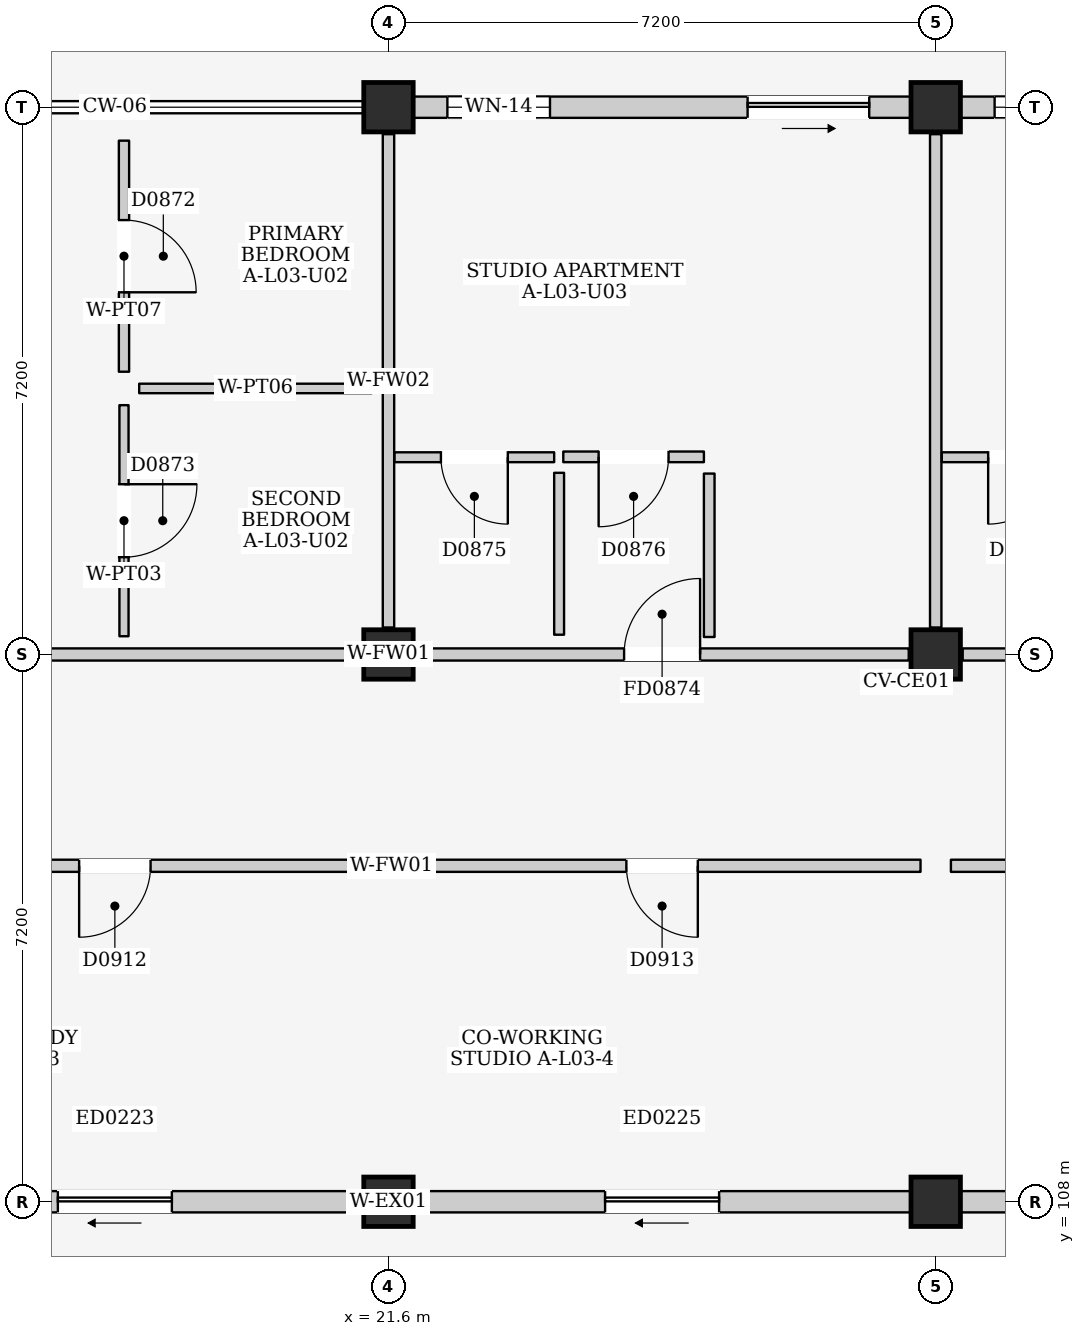
"""IFC4 building model, lengths in metres.
Left out: names, types, materials, properties, quantities, classifications, styles, units other than length and angle.
Written with IfcOpenShell. Run it as: python <this file> out.ifc"""

import sys

from ifc_helpers import new_model, si_unit, direction, frame, frame_2d, origin, origin_2d, place, context, subcontext, project, spatial, rectangle, extrude, element, fill, save


model = new_model("IFC4")
c1 = context("Model", 3, precision=1e-05, world=origin(), true_north=direction((0.0, 1.0)))
c2 = subcontext(c1, "Body", "Model", "MODEL_VIEW")
j1 = project(units=[si_unit("LENGTHUNIT", "METRE"), si_unit("PLANEANGLEUNIT", "RADIAN")], contexts=[c1])
p1 = place(None, origin())
s1 = spatial("IfcSite", under=j1, at=p1, CompositionType="ELEMENT")
p2 = place(p1, origin())
s2 = spatial("IfcBuilding", under=s1, at=p2, CompositionType="ELEMENT")
p3 = place(p2, frame((0.0, 0.0, 12.2)))
s3 = spatial("IfcBuildingStorey", under=s2, at=p3, CompositionType="ELEMENT", Elevation=12.2)
for number, where, z_axis, x_axis in (
    (1, (21.6, 108.0, 0.0), (0.0, 0.0, 1.0), (1.0, 0.0, 0.0)),
    (2, (21.6, 115.2, 0.0), (0.0, 0.0, 1.0), (1.0, 0.0, 0.0)),
    (3, (21.6, 122.4, 0.0), (0.0, 0.0, 1.0), (1.0, 0.0, 0.0)),
    (4, (28.8, 108.0, 0.0), (0.0, 0.0, 1.0), (1.0, 0.0, 0.0)),
    (5, (28.8, 115.2, 0.0), (0.0, 0.0, 1.0), (1.0, 0.0, 0.0)),
    (6, (28.8, 122.4, 0.0), (0.0, 0.0, 1.0), (1.0, 0.0, 0.0)),
):
    element("IfcColumn", number, at=place(p3, frame(where, z_axis=z_axis, x_axis=x_axis)), inside=s3, PredefinedType="COLUMN", context=c2, shape_type="SweptSolid", body=[
        extrude(rectangle(XDim=0.65, YDim=0.65, at=origin_2d()), origin(), (0.0, 0.0, 1.0), 3.2),
    ])
p4 = place(p3, frame((14.725, 108.0, 0.0), z_axis=(0.0, 0.0, 1.0), x_axis=(1.0, 0.0, 0.0)))
e7 = element("IfcWall", 7, at=p4, inside=s3, PredefinedType="ELEMENTEDWALL", context=c2, shape_type="SweptSolid", body=[
    extrude(rectangle(XDim=6.55, YDim=0.28, at=frame_2d((3.275, 0.0))), origin(), (0.0, 0.0, 1.0), 2.315),
])
p5 = place(p4, frame((2.525, 0.0, 0.0)))
e8 = element("IfcOpeningElement", 8, at=p5, cuts=e7, PredefinedType="OPENING", context=c2, shape_type="SweptSolid", body=[
    extrude(rectangle(XDim=1.5, YDim=2.12, at=frame_2d((0.75, 1.06))), frame((0.0, 0.155, 0.0), z_axis=(0.0, -1.0, 0.0), x_axis=(1.0, 0.0, 0.0)), (0.0, 0.0, 1.0), 0.31),
])
p6 = place(p3, frame((21.925, 122.4, 0.0), z_axis=(0.0, 0.0, 1.0), x_axis=(1.0, 0.0, 0.0)))
e9 = element("IfcWall", 9, at=p6, inside=s3, PredefinedType="ELEMENTEDWALL", context=c2, shape_type="SweptSolid", body=[
    extrude(rectangle(XDim=6.55, YDim=0.28, at=frame_2d((3.275, 0.0))), origin(), (0.0, 0.0, 1.0), 2.445),
])
p7 = place(p6, frame((4.4, 0.0, 0.0)))
e10 = element("IfcOpeningElement", 10, at=p7, cuts=e9, PredefinedType="OPENING", context=c2, shape_type="SweptSolid", body=[
    extrude(rectangle(XDim=1.6, YDim=2.12, at=frame_2d((0.8, 1.06))), frame((0.0, 0.155, 0.0), z_axis=(0.0, -1.0, 0.0), x_axis=(1.0, 0.0, 0.0)), (0.0, 0.0, 1.0), 0.31),
])
p8 = place(p6, frame((0.45, 0.0, 0.835)))
e11 = element("IfcOpeningElement", 11, at=p8, cuts=e9, PredefinedType="OPENING", context=c2, shape_type="SweptSolid", body=[
    extrude(rectangle(XDim=1.35, YDim=1.5, at=frame_2d((0.675, 0.75))), frame((0.0, 0.155, 0.0), z_axis=(0.0, -1.0, 0.0), x_axis=(1.0, 0.0, 0.0)), (0.0, 0.0, 1.0), 0.31),
])
p9 = place(p3, frame((21.925, 108.0, 0.0), z_axis=(0.0, 0.0, 1.0), x_axis=(1.0, 0.0, 0.0)))
e12 = element("IfcWall", 12, at=p9, inside=s3, PredefinedType="ELEMENTEDWALL", context=c2, shape_type="SweptSolid", body=[
    extrude(rectangle(XDim=6.55, YDim=0.28, at=frame_2d((3.275, 0.0))), origin(), (0.0, 0.0, 1.0), 2.315),
])
p10 = place(p9, frame((2.525, 0.0, 0.0)))
e13 = element("IfcOpeningElement", 13, at=p10, cuts=e12, PredefinedType="OPENING", context=c2, shape_type="SweptSolid", body=[
    extrude(rectangle(XDim=1.5, YDim=2.12, at=frame_2d((0.75, 1.06))), frame((0.0, 0.155, 0.0), z_axis=(0.0, -1.0, 0.0), x_axis=(1.0, 0.0, 0.0)), (0.0, 0.0, 1.0), 0.31),
])
p11 = place(p3, frame((29.125, 122.4, 0.0), z_axis=(0.0, 0.0, 1.0), x_axis=(1.0, 0.0, 0.0)))
e14 = element("IfcWall", 14, at=p11, inside=s3, PredefinedType="ELEMENTEDWALL", context=c2, shape_type="SweptSolid", body=[
    extrude(rectangle(XDim=6.55, YDim=0.28, at=frame_2d((3.275, 0.0))), origin(), (0.0, 0.0, 1.0), 2.445),
])
p12 = place(p11, frame((4.5, 0.0, 0.0)))
e15 = element("IfcOpeningElement", 15, at=p12, cuts=e14, PredefinedType="OPENING", context=c2, shape_type="SweptSolid", body=[
    extrude(rectangle(XDim=1.5, YDim=2.12, at=frame_2d((0.75, 1.06))), frame((0.0, 0.155, 0.0), z_axis=(0.0, -1.0, 0.0), x_axis=(1.0, 0.0, 0.0)), (0.0, 0.0, 1.0), 0.31),
])
p13 = place(p11, frame((0.45, 0.0, 0.885)))
e16 = element("IfcOpeningElement", 16, at=p13, cuts=e14, PredefinedType="OPENING", context=c2, shape_type="SweptSolid", body=[
    extrude(rectangle(XDim=1.7, YDim=1.45, at=frame_2d((0.85, 0.725))), frame((0.0, 0.155, 0.0), z_axis=(0.0, -1.0, 0.0), x_axis=(1.0, 0.0, 0.0)), (0.0, 0.0, 1.0), 0.31),
])
p14 = place(p3, frame((29.125, 108.0, 0.0), z_axis=(0.0, 0.0, 1.0), x_axis=(1.0, 0.0, 0.0)))
e17 = element("IfcWall", 17, at=p14, inside=s3, PredefinedType="ELEMENTEDWALL", context=c2, shape_type="SweptSolid", body=[
    extrude(rectangle(XDim=6.55, YDim=0.28, at=frame_2d((3.275, 0.0))), origin(), (0.0, 0.0, 1.0), 2.315),
])
p15 = place(p14, frame((2.525, 0.0, 0.0)))
e18 = element("IfcOpeningElement", 18, at=p15, cuts=e17, PredefinedType="OPENING", context=c2, shape_type="SweptSolid", body=[
    extrude(rectangle(XDim=1.5, YDim=2.12, at=frame_2d((0.75, 1.06))), frame((0.0, 0.155, 0.0), z_axis=(0.0, -1.0, 0.0), x_axis=(1.0, 0.0, 0.0)), (0.0, 0.0, 1.0), 0.31),
])
p16 = place(p3, frame((14.755, 115.2, 0.0), z_axis=(0.0, 0.0, 1.0), x_axis=(1.0, 0.0, 0.0)))
e19 = element("IfcWall", 19, at=p16, inside=s3, PredefinedType="PARTITIONING", context=c2, shape_type="SweptSolid", body=[
    extrude(rectangle(XDim=6.49, YDim=0.16, at=frame_2d((3.245, 0.0))), origin(), (0.0, 0.0, 1.0), 2.315),
])
p17 = place(p3, frame((21.6, 115.555, 0.0), z_axis=(0.0, 0.0, 1.0), x_axis=(0.0, 1.0, 0.0)))
e20 = element("IfcWall", 20, at=p17, inside=s3, PredefinedType="PARTITIONING", context=c2, shape_type="SweptSolid", body=[
    extrude(rectangle(XDim=6.49, YDim=0.15, at=frame_2d((3.245, 0.0))), origin(), (0.0, 0.0, 1.0), 2.415),
])
p18 = place(p3, frame((18.12, 118.92, 0.0), z_axis=(0.0, 0.0, 1.0), x_axis=(0.0, 1.0, 0.0)))
e21 = element("IfcWall", 21, at=p18, inside=s3, PredefinedType="PARTITIONING", context=c2, shape_type="SweptSolid", body=[
    extrude(rectangle(XDim=3.04, YDim=0.135, at=frame_2d((1.52, 0.0))), origin(), (0.0, 0.0, 1.0), 2.98),
])
p19 = place(p18, frame((1.045, 0.0, 0.0)))
e22 = element("IfcOpeningElement", 22, at=p19, cuts=e21, PredefinedType="OPENING", context=c2, shape_type="SweptSolid", body=[
    extrude(rectangle(XDim=0.95, YDim=2.15, at=frame_2d((0.475, 1.075))), frame((0.0, 0.083, 0.0), z_axis=(0.0, -1.0, 0.0), x_axis=(1.0, 0.0, 0.0)), (0.0, 0.0, 1.0), 0.165),
])
p20 = place(p3, frame((18.32, 118.7, 0.0), z_axis=(0.0, 0.0, 1.0), x_axis=(1.0, 0.0, 0.0)))
e23 = element("IfcWall", 23, at=p20, inside=s3, PredefinedType="PARTITIONING", context=c2, shape_type="SweptSolid", body=[
    extrude(rectangle(XDim=3.06, YDim=0.125, at=frame_2d((1.53, 0.0))), origin(), (0.0, 0.0, 1.0), 2.98),
])
p21 = place(p3, frame((18.12, 115.44, 0.0), z_axis=(0.0, 0.0, 1.0), x_axis=(0.0, 1.0, 0.0)))
e24 = element("IfcWall", 24, at=p21, inside=s3, PredefinedType="PARTITIONING", context=c2, shape_type="SweptSolid", body=[
    extrude(rectangle(XDim=3.04, YDim=0.12, at=frame_2d((1.52, 0.0))), origin(), (0.0, 0.0, 1.0), 2.98),
])
p22 = place(p21, frame((1.04, 0.0, 0.0)))
e25 = element("IfcOpeningElement", 25, at=p22, cuts=e24, PredefinedType="OPENING", context=c2, shape_type="SweptSolid", body=[
    extrude(rectangle(XDim=0.96, YDim=2.15, at=frame_2d((0.48, 1.075))), frame((0.0, 0.075, 0.0), z_axis=(0.0, -1.0, 0.0), x_axis=(1.0, 0.0, 0.0)), (0.0, 0.0, 1.0), 0.15),
])
p23 = place(p3, frame((21.955, 115.2, 0.0), z_axis=(0.0, 0.0, 1.0), x_axis=(1.0, 0.0, 0.0)))
e26 = element("IfcWall", 26, at=p23, inside=s3, PredefinedType="PARTITIONING", context=c2, shape_type="SweptSolid", body=[
    extrude(rectangle(XDim=6.49, YDim=0.16, at=frame_2d((3.245, 0.0))), origin(), (0.0, 0.0, 1.0), 2.315),
])
p24 = place(p23, frame((2.745, 0.0, 0.0)))
e27 = element("IfcOpeningElement", 27, at=p24, cuts=e26, PredefinedType="OPENING", context=c2, shape_type="SweptSolid", body=[
    extrude(rectangle(XDim=1.0, YDim=2.15, at=frame_2d((0.5, 1.075))), frame((0.0, 0.095, 0.0), z_axis=(0.0, -1.0, 0.0), x_axis=(1.0, 0.0, 0.0)), (0.0, 0.0, 1.0), 0.19),
])
p25 = place(p3, frame((28.8, 115.555, 0.0), z_axis=(0.0, 0.0, 1.0), x_axis=(0.0, 1.0, 0.0)))
e28 = element("IfcWall", 28, at=p25, inside=s3, PredefinedType="PARTITIONING", context=c2, shape_type="SweptSolid", body=[
    extrude(rectangle(XDim=6.49, YDim=0.15, at=frame_2d((3.245, 0.0))), origin(), (0.0, 0.0, 1.0), 2.415),
])
p26 = place(p3, frame((21.68, 117.795, 0.0), z_axis=(0.0, 0.0, 1.0), x_axis=(1.0, 0.0, 0.0)))
e29 = element("IfcWall", 29, at=p26, inside=s3, PredefinedType="PARTITIONING", context=c2, shape_type="SweptSolid", body=[
    extrude(rectangle(XDim=2.1, YDim=0.13, at=frame_2d((1.05, 0.0))), origin(), (0.0, 0.0, 1.0), 2.98),
])
p27 = place(p26, frame((0.61, 0.0, 0.0)))
e30 = element("IfcOpeningElement", 30, at=p27, cuts=e29, PredefinedType="OPENING", context=c2, shape_type="SweptSolid", body=[
    extrude(rectangle(XDim=0.88, YDim=2.1, at=frame_2d((0.44, 1.05))), frame((0.0, 0.08, 0.0), z_axis=(0.0, -1.0, 0.0), x_axis=(1.0, 0.0, 0.0)), (0.0, 0.0, 1.0), 0.16),
])
p28 = place(p3, frame((23.845, 115.46, 0.0), z_axis=(0.0, 0.0, 1.0), x_axis=(0.0, 1.0, 0.0)))
e31 = element("IfcWall", 31, at=p28, inside=s3, PredefinedType="PARTITIONING", context=c2, shape_type="SweptSolid", body=[
    extrude(rectangle(XDim=2.13, YDim=0.13, at=frame_2d((1.065, 0.0))), origin(), (0.0, 0.0, 1.0), 2.98),
])
p29 = place(p3, frame((23.9, 117.8, 0.0), z_axis=(0.0, 0.0, 1.0), x_axis=(1.0, 0.0, 0.0)))
e32 = element("IfcWall", 32, at=p29, inside=s3, PredefinedType="PARTITIONING", context=c2, shape_type="SweptSolid", body=[
    extrude(rectangle(XDim=1.85, YDim=0.14, at=frame_2d((0.925, 0.0))), origin(), (0.0, 0.0, 1.0), 2.98),
])
p30 = place(p29, frame((0.465, 0.0, 0.0)))
e33 = element("IfcOpeningElement", 33, at=p30, cuts=e32, PredefinedType="OPENING", context=c2, shape_type="SweptSolid", body=[
    extrude(rectangle(XDim=0.92, YDim=2.1, at=frame_2d((0.46, 1.05))), frame((0.0, 0.085, 0.0), z_axis=(0.0, -1.0, 0.0), x_axis=(1.0, 0.0, 0.0)), (0.0, 0.0, 1.0), 0.17),
])
p31 = place(p3, frame((25.82, 115.43, 0.0), z_axis=(0.0, 0.0, 1.0), x_axis=(0.0, 1.0, 0.0)))
e34 = element("IfcWall", 34, at=p31, inside=s3, PredefinedType="PARTITIONING", context=c2, shape_type="SweptSolid", body=[
    extrude(rectangle(XDim=2.15, YDim=0.14, at=frame_2d((1.075, 0.0))), origin(), (0.0, 0.0, 1.0), 2.98),
])
p32 = place(p3, frame((29.155, 115.2, 0.0), z_axis=(0.0, 0.0, 1.0), x_axis=(1.0, 0.0, 0.0)))
e35 = element("IfcWall", 35, at=p32, inside=s3, PredefinedType="PARTITIONING", context=c2, shape_type="SweptSolid", body=[
    extrude(rectangle(XDim=6.49, YDim=0.16, at=frame_2d((3.245, 0.0))), origin(), (0.0, 0.0, 1.0), 2.315),
])
p33 = place(p32, frame((2.745, 0.0, 0.0)))
e36 = element("IfcOpeningElement", 36, at=p33, cuts=e35, PredefinedType="OPENING", context=c2, shape_type="SweptSolid", body=[
    extrude(rectangle(XDim=1.0, YDim=2.15, at=frame_2d((0.5, 1.075))), frame((0.0, 0.095, 0.0), z_axis=(0.0, -1.0, 0.0), x_axis=(1.0, 0.0, 0.0)), (0.0, 0.0, 1.0), 0.19),
])
p34 = place(p3, frame((28.88, 117.795, 0.0), z_axis=(0.0, 0.0, 1.0), x_axis=(1.0, 0.0, 0.0)))
e37 = element("IfcWall", 37, at=p34, inside=s3, PredefinedType="PARTITIONING", context=c2, shape_type="SweptSolid", body=[
    extrude(rectangle(XDim=2.1, YDim=0.13, at=frame_2d((1.05, 0.0))), origin(), (0.0, 0.0, 1.0), 2.98),
])
p35 = place(p34, frame((0.61, 0.0, 0.0)))
e38 = element("IfcOpeningElement", 38, at=p35, cuts=e37, PredefinedType="OPENING", context=c2, shape_type="SweptSolid", body=[
    extrude(rectangle(XDim=0.88, YDim=2.1, at=frame_2d((0.44, 1.05))), frame((0.0, 0.08, 0.0), z_axis=(0.0, -1.0, 0.0), x_axis=(1.0, 0.0, 0.0)), (0.0, 0.0, 1.0), 0.16),
])
p36 = place(p3, frame((14.6, 112.42, 0.0), z_axis=(0.0, 0.0, 1.0), x_axis=(1.0, 0.0, 0.0)))
e39 = element("IfcWall", 39, at=p36, inside=s3, PredefinedType="PARTITIONING", context=c2, shape_type="SweptSolid", body=[
    extrude(rectangle(XDim=6.8, YDim=0.16, at=frame_2d((3.4, 0.0))), origin(), (0.0, 0.0, 1.0), 2.98),
])
p37 = place(p36, frame((2.93, 0.0, 0.0)))
e40 = element("IfcOpeningElement", 40, at=p37, cuts=e39, PredefinedType="OPENING", context=c2, shape_type="SweptSolid", body=[
    extrude(rectangle(XDim=0.94, YDim=2.12, at=frame_2d((0.47, 1.06))), frame((0.0, 0.095, 0.0), z_axis=(0.0, -1.0, 0.0), x_axis=(1.0, 0.0, 0.0)), (0.0, 0.0, 1.0), 0.19),
])
p38 = place(p3, frame((21.8, 112.42, 0.0), z_axis=(0.0, 0.0, 1.0), x_axis=(1.0, 0.0, 0.0)))
e41 = element("IfcWall", 41, at=p38, inside=s3, PredefinedType="PARTITIONING", context=c2, shape_type="SweptSolid", body=[
    extrude(rectangle(XDim=6.8, YDim=0.16, at=frame_2d((3.4, 0.0))), origin(), (0.0, 0.0, 1.0), 2.98),
])
p39 = place(p38, frame((2.93, 0.0, 0.0)))
e42 = element("IfcOpeningElement", 42, at=p39, cuts=e41, PredefinedType="OPENING", context=c2, shape_type="SweptSolid", body=[
    extrude(rectangle(XDim=0.94, YDim=2.12, at=frame_2d((0.47, 1.06))), frame((0.0, 0.095, 0.0), z_axis=(0.0, -1.0, 0.0), x_axis=(1.0, 0.0, 0.0)), (0.0, 0.0, 1.0), 0.19),
])
p40 = place(p3, frame((29.0, 112.42, 0.0), z_axis=(0.0, 0.0, 1.0), x_axis=(1.0, 0.0, 0.0)))
e43 = element("IfcWall", 43, at=p40, inside=s3, PredefinedType="PARTITIONING", context=c2, shape_type="SweptSolid", body=[
    extrude(rectangle(XDim=6.8, YDim=0.16, at=frame_2d((3.4, 0.0))), origin(), (0.0, 0.0, 1.0), 2.98),
])
p41 = place(p40, frame((2.93, 0.0, 0.0)))
e44 = element("IfcOpeningElement", 44, at=p41, cuts=e43, PredefinedType="OPENING", context=c2, shape_type="SweptSolid", body=[
    extrude(rectangle(XDim=0.94, YDim=2.12, at=frame_2d((0.47, 1.06))), frame((0.0, 0.095, 0.0), z_axis=(0.0, -1.0, 0.0), x_axis=(1.0, 0.0, 0.0)), (0.0, 0.0, 1.0), 0.19),
])
p42 = place(p5, frame((1.5, 0.0, 0.0), z_axis=(0.0, 0.0, 1.0), x_axis=(-1.0, 0.0, 0.0)))
e45 = element("IfcDoor", 45, at=p42, inside=s3, OperationType="SLIDING_TO_LEFT", PredefinedType="DOOR", context=c2, shape_type="SweptSolid", body=[
    extrude(rectangle(XDim=1.5, YDim=2.12, at=frame_2d((0.75, 1.06))), frame((0.0, 0.025, 0.0), z_axis=(0.0, -1.0, 0.0), x_axis=(1.0, 0.0, 0.0)), (0.0, 0.0, 1.0), 0.05),
])
fill(e8, e45)
p43 = place(p7, frame((1.6, 0.0, 0.0), z_axis=(0.0, 0.0, 1.0), x_axis=(-1.0, 0.0, 0.0)))
e46 = element("IfcDoor", 46, at=p43, inside=s3, OperationType="SLIDING_TO_RIGHT", PredefinedType="DOOR", context=c2, shape_type="SweptSolid", body=[
    extrude(rectangle(XDim=1.6, YDim=2.12, at=frame_2d((0.8, 1.06))), frame((0.0, 0.025, 0.0), z_axis=(0.0, -1.0, 0.0), x_axis=(1.0, 0.0, 0.0)), (0.0, 0.0, 1.0), 0.05),
])
fill(e10, e46)
p44 = place(p8, origin())
e47 = element("IfcWindow", 47, at=p44, inside=s3, PartitioningType="SINGLE_PANEL", PredefinedType="WINDOW", context=c2, shape_type="SweptSolid", body=[
    extrude(rectangle(XDim=1.35, YDim=1.5, at=frame_2d((0.675, 0.75))), frame((0.0, 0.03, 0.0), z_axis=(0.0, -1.0, 0.0), x_axis=(1.0, 0.0, 0.0)), (0.0, 0.0, 1.0), 0.06),
])
fill(e11, e47)
p45 = place(p10, frame((1.5, 0.0, 0.0), z_axis=(0.0, 0.0, 1.0), x_axis=(-1.0, 0.0, 0.0)))
e48 = element("IfcDoor", 48, at=p45, inside=s3, OperationType="SLIDING_TO_LEFT", PredefinedType="DOOR", context=c2, shape_type="SweptSolid", body=[
    extrude(rectangle(XDim=1.5, YDim=2.12, at=frame_2d((0.75, 1.06))), frame((0.0, 0.025, 0.0), z_axis=(0.0, -1.0, 0.0), x_axis=(1.0, 0.0, 0.0)), (0.0, 0.0, 1.0), 0.05),
])
fill(e13, e48)
p46 = place(p13, origin())
e49 = element("IfcWindow", 49, at=p46, inside=s3, PartitioningType="DOUBLE_PANEL_VERTICAL", PredefinedType="WINDOW", context=c2, shape_type="SweptSolid", body=[
    extrude(rectangle(XDim=1.7, YDim=1.45, at=frame_2d((0.85, 0.725))), frame((0.0, 0.03, 0.0), z_axis=(0.0, -1.0, 0.0), x_axis=(1.0, 0.0, 0.0)), (0.0, 0.0, 1.0), 0.06),
])
fill(e16, e49)
p47 = place(p19, frame((0.95, 0.0, 0.0), z_axis=(0.0, 0.0, 1.0), x_axis=(-1.0, 0.0, 0.0)))
e50 = element("IfcDoor", 50, at=p47, inside=s3, OperationType="SINGLE_SWING_RIGHT", PredefinedType="DOOR", context=c2, shape_type="SweptSolid", body=[
    extrude(rectangle(XDim=0.95, YDim=2.15, at=frame_2d((0.475, 1.075))), frame((0.0, 0.025, 0.0), z_axis=(0.0, -1.0, 0.0), x_axis=(1.0, 0.0, 0.0)), (0.0, 0.0, 1.0), 0.05),
])
fill(e22, e50)
p48 = place(p22, frame((0.96, 0.0, 0.0), z_axis=(0.0, 0.0, 1.0), x_axis=(-1.0, 0.0, 0.0)))
e51 = element("IfcDoor", 51, at=p48, inside=s3, OperationType="SINGLE_SWING_LEFT", PredefinedType="DOOR", context=c2, shape_type="SweptSolid", body=[
    extrude(rectangle(XDim=0.96, YDim=2.15, at=frame_2d((0.48, 1.075))), frame((0.0, 0.025, 0.0), z_axis=(0.0, -1.0, 0.0), x_axis=(1.0, 0.0, 0.0)), (0.0, 0.0, 1.0), 0.05),
])
fill(e25, e51)
p49 = place(p24, origin())
e52 = element("IfcDoor", 52, at=p49, inside=s3, OperationType="SINGLE_SWING_RIGHT", PredefinedType="DOOR", context=c2, shape_type="SweptSolid", body=[
    extrude(rectangle(XDim=1.0, YDim=2.15, at=frame_2d((0.5, 1.075))), frame((0.0, 0.025, 0.0), z_axis=(0.0, -1.0, 0.0), x_axis=(1.0, 0.0, 0.0)), (0.0, 0.0, 1.0), 0.05),
])
fill(e27, e52)
p50 = place(p27, frame((0.88, 0.0, 0.0), z_axis=(0.0, 0.0, 1.0), x_axis=(-1.0, 0.0, 0.0)))
e53 = element("IfcDoor", 53, at=p50, inside=s3, OperationType="SINGLE_SWING_LEFT", PredefinedType="DOOR", context=c2, shape_type="SweptSolid", body=[
    extrude(rectangle(XDim=0.88, YDim=2.1, at=frame_2d((0.44, 1.05))), frame((0.0, 0.025, 0.0), z_axis=(0.0, -1.0, 0.0), x_axis=(1.0, 0.0, 0.0)), (0.0, 0.0, 1.0), 0.05),
])
fill(e30, e53)
p51 = place(p30, frame((0.92, 0.0, 0.0), z_axis=(0.0, 0.0, 1.0), x_axis=(-1.0, 0.0, 0.0)))
e54 = element("IfcDoor", 54, at=p51, inside=s3, OperationType="SINGLE_SWING_RIGHT", PredefinedType="DOOR", context=c2, shape_type="SweptSolid", body=[
    extrude(rectangle(XDim=0.92, YDim=2.1, at=frame_2d((0.46, 1.05))), frame((0.0, 0.025, 0.0), z_axis=(0.0, -1.0, 0.0), x_axis=(1.0, 0.0, 0.0)), (0.0, 0.0, 1.0), 0.05),
])
fill(e33, e54)
p52 = place(p35, frame((0.88, 0.0, 0.0), z_axis=(0.0, 0.0, 1.0), x_axis=(-1.0, 0.0, 0.0)))
e55 = element("IfcDoor", 55, at=p52, inside=s3, OperationType="SINGLE_SWING_RIGHT", PredefinedType="DOOR", context=c2, shape_type="SweptSolid", body=[
    extrude(rectangle(XDim=0.88, YDim=2.1, at=frame_2d((0.44, 1.05))), frame((0.0, 0.025, 0.0), z_axis=(0.0, -1.0, 0.0), x_axis=(1.0, 0.0, 0.0)), (0.0, 0.0, 1.0), 0.05),
])
fill(e38, e55)
p53 = place(p37, frame((0.94, 0.0, 0.0), z_axis=(0.0, 0.0, 1.0), x_axis=(-1.0, 0.0, 0.0)))
e56 = element("IfcDoor", 56, at=p53, inside=s3, OperationType="SINGLE_SWING_RIGHT", PredefinedType="DOOR", context=c2, shape_type="SweptSolid", body=[
    extrude(rectangle(XDim=0.94, YDim=2.12, at=frame_2d((0.47, 1.06))), frame((0.0, 0.025, 0.0), z_axis=(0.0, -1.0, 0.0), x_axis=(1.0, 0.0, 0.0)), (0.0, 0.0, 1.0), 0.05),
])
fill(e40, e56)
p54 = place(p39, frame((0.94, 0.0, 0.0), z_axis=(0.0, 0.0, 1.0), x_axis=(-1.0, 0.0, 0.0)))
e57 = element("IfcDoor", 57, at=p54, inside=s3, OperationType="SINGLE_SWING_LEFT", PredefinedType="DOOR", context=c2, shape_type="SweptSolid", body=[
    extrude(rectangle(XDim=0.94, YDim=2.12, at=frame_2d((0.47, 1.06))), frame((0.0, 0.025, 0.0), z_axis=(0.0, -1.0, 0.0), x_axis=(1.0, 0.0, 0.0)), (0.0, 0.0, 1.0), 0.05),
])
fill(e42, e57)
save(model, sys.argv[1])
